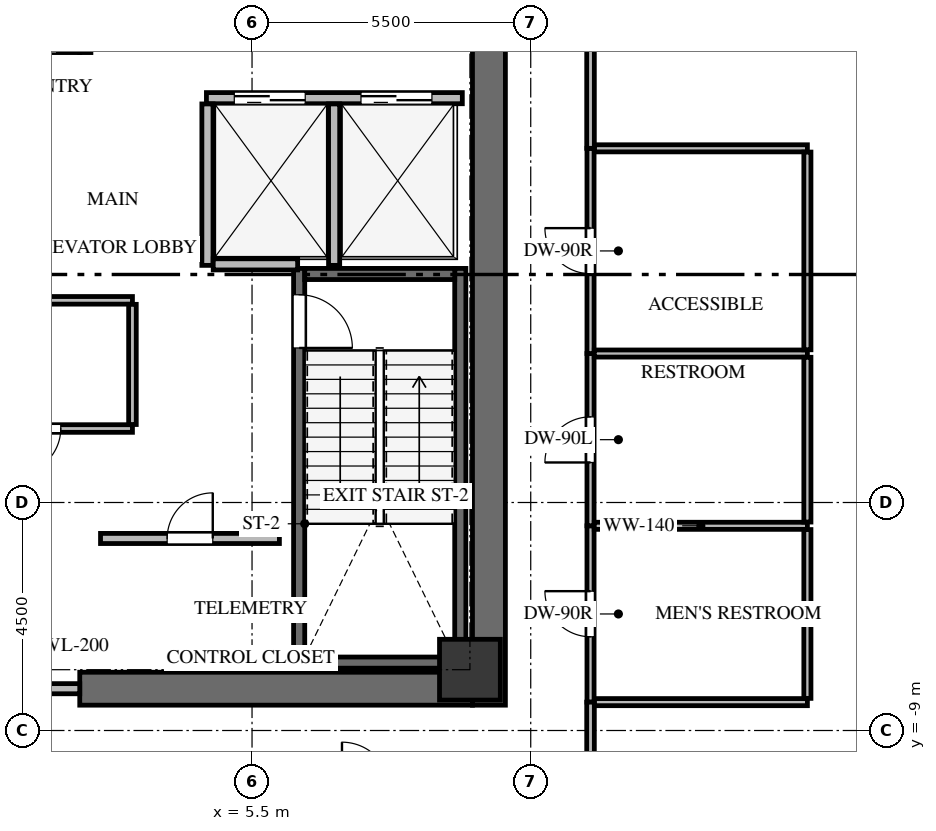
"""IFC4 building model, lengths in metres.
Left out: names, types, materials, properties, quantities, classifications, styles, units other than length and angle.
Written with IfcOpenShell. Run it as: python <this file> out.ifc"""

import sys

from ifc_helpers import new_model, si_unit, direction, frame, frame_2d, origin, origin_2d, place, context, subcontext, project, spatial, rectangle, extrude, source, transform, mapped, element, fill, save


model = new_model("IFC4")
c1 = context("Model", 3, precision=1e-05, world=origin(), true_north=direction((0.0, 1.0)))
c2 = subcontext(c1, "Body", "Model", "MODEL_VIEW")
j1 = project(units=[si_unit("LENGTHUNIT", "METRE"), si_unit("PLANEANGLEUNIT", "RADIAN")], contexts=[c1])
p1 = place(None, origin())
s1 = spatial("IfcSite", under=j1, at=p1, CompositionType="ELEMENT")
p2 = place(p1, origin())
s2 = spatial("IfcBuilding", under=s1, at=p2, CompositionType="ELEMENT")
p3 = place(p2, frame((0.0, 0.0, 162.6)))
s3 = spatial("IfcBuildingStorey", under=s2, at=p3, CompositionType="ELEMENT", Elevation=162.6)
p4 = place(p3, frame((10.175, -8.5, 0.0), z_axis=(0.0, 0.0, 1.0), x_axis=(0.0, 1.0, 0.0)))
e1 = element("IfcWall", 1, at=p4, inside=s3, PredefinedType="SHEAR", context=c2, shape_type="SweptSolid", body=[
    extrude(rectangle(XDim=17.0, YDim=0.65, at=frame_2d((8.5, 0.0))), origin(), (0.0, 0.0, 1.0), 4.6),
])
p5 = place(p3, frame((2.1, -8.175, 0.0), z_axis=(0.0, 0.0, 1.0), x_axis=(1.0, 0.0, 0.0)))
e2 = element("IfcWall", 2, at=p5, inside=s3, PredefinedType="SHEAR", context=c2, shape_type="SweptSolid", body=[
    extrude(rectangle(XDim=7.75, YDim=0.65, at=frame_2d((3.875, 0.0))), origin(), (0.0, 0.0, 1.0), 4.6),
])
p6 = place(p3, frame((9.61, -7.77, -0.32), z_axis=(0.0, 0.0, 1.0), x_axis=(0.0, 1.0, 0.0)))
e3 = element("IfcWall", 3, at=p6, inside=s3, PredefinedType="SHEAR", context=c2, shape_type="SweptSolid", body=[
    extrude(rectangle(XDim=7.89, YDim=0.22, at=frame_2d((3.945, 0.0))), origin(), (0.0, 0.0, 1.0), 4.68),
])
p7 = place(p3, frame((6.43, 0.12, -0.32), z_axis=(0.0, 0.0, 1.0), x_axis=(0.0, -1.0, 0.0)))
e4 = element("IfcWall", 4, at=p7, inside=s3, PredefinedType="SHEAR", context=c2, shape_type="SweptSolid", body=[
    extrude(rectangle(XDim=7.89, YDim=0.22, at=frame_2d((3.945, 0.0))), origin(), (0.0, 0.0, 1.0), 4.68),
])
p8 = place(p7, frame((0.52, 0.0, 0.0)))
e5 = element("IfcOpeningElement", 5, at=p8, cuts=e4, PredefinedType="OPENING", context=c2, shape_type="SweptSolid", body=[
    extrude(rectangle(XDim=1.05, YDim=2.15, at=frame_2d((0.525, 1.075))), frame((0.0, 0.12, 0.0), z_axis=(0.0, -1.0, 0.0), x_axis=(1.0, 0.0, 0.0)), (0.0, 0.0, 1.0), 0.24),
])
for number, where, z_axis, x_axis in (
    (6, (6.54, -7.66, -0.32), (0.0, 0.0, 1.0), (1.0, 0.0, 0.0)),
    (7, (9.5, 0.01, -0.32), (0.0, 0.0, 1.0), (-1.0, 0.0, 0.0)),
):
    element("IfcWall", number, at=place(p3, frame(where, z_axis=z_axis, x_axis=x_axis)), inside=s3, PredefinedType="SHEAR", context=c2, shape_type="SweptSolid", body=[
        extrude(rectangle(XDim=2.96, YDim=0.22, at=frame_2d((1.48, 0.0))), origin(), (0.0, 0.0, 1.0), 4.68),
    ])
p9 = place(p3, frame((2.21, 4.38, -0.32), z_axis=(0.0, 0.0, 1.0), x_axis=(0.0, 1.0, 0.0)))
e8 = element("IfcWall", 8, at=p9, inside=s3, PredefinedType="SHEAR", context=c2, shape_type="SweptSolid", body=[
    extrude(rectangle(XDim=3.4, YDim=0.22, at=frame_2d((1.7, 0.0))), origin(), (0.0, 0.0, 1.0), 4.68),
])
p10 = place(p3, frame((-5.25, 4.49, -0.32), z_axis=(0.0, 0.0, 1.0), x_axis=(1.0, 0.0, 0.0)))
e9 = element("IfcWall", 9, at=p10, inside=s3, PredefinedType="SHEAR", context=c2, shape_type="SweptSolid", body=[
    extrude(rectangle(XDim=7.35, YDim=0.22, at=frame_2d((3.675, 0.0))), origin(), (0.0, 0.0, 1.0), 4.68),
])
p11 = place(p10, frame((5.85, 0.0, 0.0)))
e10 = element("IfcOpeningElement", 10, at=p11, cuts=e9, PredefinedType="OPENING", context=c2, shape_type="SweptSolid", body=[
    extrude(rectangle(XDim=1.05, YDim=2.15, at=frame_2d((0.525, 1.075))), frame((0.0, 0.12, 0.0), z_axis=(0.0, -1.0, 0.0), x_axis=(1.0, 0.0, 0.0)), (0.0, 0.0, 1.0), 0.24),
])
m1 = source(origin(), c2, "Body", "SweptSolid", [
    extrude(rectangle(XDim=1.2, YDim=1.2, at=origin_2d()), origin(), (0.0, 0.0, 1.0), 4.68),
])
p12 = place(p3, frame((9.8, -7.8, -0.32), z_axis=(0.0, 0.0, 1.0), x_axis=(1.0, 0.0, 0.0)))
e11 = element("IfcColumn", 11, at=p12, inside=s3, PredefinedType="COLUMN", context=c2, shape_type="MappedRepresentation", body=[
    mapped(m1, transform((0.0, 0.0, 0.0), x_axis=(1.0, 0.0, 0.0), y_axis=(0.0, 1.0, 0.0), z_axis=(0.0, 0.0, 1.0), scale=1.0)),
])
p13 = place(p3, frame((-2.1, -8.175, 0.0), z_axis=(0.0, 0.0, 1.0), x_axis=(1.0, 0.0, 0.0)))
e12 = element("IfcWall", 12, at=p13, inside=s3, PredefinedType="SOLIDWALL", context=c2, shape_type="SweptSolid", body=[
    extrude(rectangle(XDim=4.2, YDim=0.2, at=frame_2d((2.1, 0.0))), origin(), (0.0, 0.0, 1.0), 4.345),
])
p14 = place(p13, frame((1.2, 0.0, 0.0)))
e13 = element("IfcOpeningElement", 13, at=p14, cuts=e12, PredefinedType="OPENING", context=c2, shape_type="SweptSolid", body=[
    extrude(rectangle(XDim=1.8, YDim=2.15, at=frame_2d((0.9, 1.075))), frame((0.0, 0.11, 0.0), z_axis=(0.0, -1.0, 0.0), x_axis=(1.0, 0.0, 0.0)), (0.0, 0.0, 1.0), 0.22),
])
p15 = place(p3, frame((4.6, 3.48, 0.0), z_axis=(0.0, 0.0, 1.0), x_axis=(1.0, 0.0, 0.0)))
e14 = element("IfcWall", 14, at=p15, inside=s3, PredefinedType="SOLIDWALL", context=c2, shape_type="SweptSolid", body=[
    extrude(rectangle(XDim=5.05, YDim=0.22, at=frame_2d((2.525, 0.0))), origin(), (0.0, 0.0, 1.0), 4.345),
])
p16 = place(p15, frame((0.55, 0.0, 0.0)))
e15 = element("IfcOpeningElement", 15, at=p16, cuts=e14, PredefinedType="OPENING", context=c2, shape_type="SweptSolid", body=[
    extrude(rectangle(XDim=1.4, YDim=2.15, at=frame_2d((0.7, 1.075))), frame((0.0, 0.12, 0.0), z_axis=(0.0, -1.0, 0.0), x_axis=(1.0, 0.0, 0.0)), (0.0, 0.0, 1.0), 0.24),
])
p17 = place(p15, frame((3.05, 0.0, 0.0)))
e16 = element("IfcOpeningElement", 16, at=p17, cuts=e14, PredefinedType="OPENING", context=c2, shape_type="SweptSolid", body=[
    extrude(rectangle(XDim=1.4, YDim=2.15, at=frame_2d((0.7, 1.075))), frame((0.0, 0.12, 0.0), z_axis=(0.0, -1.0, 0.0), x_axis=(1.0, 0.0, 0.0)), (0.0, 0.0, 1.0), 0.24),
])
for number, where, z_axis, x_axis in (
    (17, (4.62, 0.18, 0.0), (0.0, 0.0, 1.0), (0.0, 1.0, 0.0)),
    (18, (7.12, 0.18, 0.0), (0.0, 0.0, 1.0), (0.0, 1.0, 0.0)),
):
    element("IfcWall", number, at=place(p3, frame(where, z_axis=z_axis, x_axis=x_axis)), inside=s3, PredefinedType="SOLIDWALL", context=c2, shape_type="SweptSolid", body=[
        extrude(rectangle(XDim=3.186, YDim=0.22, at=frame_2d((1.593, 0.0))), origin(), (0.0, 0.0, 1.0), 4.345),
    ])
p18 = place(p3, frame((4.734, 0.2, 0.0), z_axis=(0.0, 0.0, 1.0), x_axis=(1.0, 0.0, 0.0)))
e19 = element("IfcWall", 19, at=p18, inside=s3, PredefinedType="SOLIDWALL", context=c2, shape_type="SweptSolid", body=[
    extrude(rectangle(XDim=1.666, YDim=0.22, at=frame_2d((0.833, 0.0))), origin(), (0.0, 0.0, 1.0), 4.345),
])
p19 = place(p3, frame((2.51, -5.21, 0.0), z_axis=(0.0, 0.0, 1.0), x_axis=(1.0, 0.0, 0.0)))
e20 = element("IfcWall", 20, at=p19, inside=s3, PredefinedType="SOLIDWALL", context=c2, shape_type="SweptSolid", body=[
    extrude(rectangle(XDim=3.53, YDim=0.2, at=frame_2d((1.765, 0.0))), origin(), (0.0, 0.0, 1.0), 4.345),
])
p20 = place(p19, frame((1.315, 0.0, 0.0)))
e21 = element("IfcOpeningElement", 21, at=p20, cuts=e20, PredefinedType="OPENING", context=c2, shape_type="SweptSolid", body=[
    extrude(rectangle(XDim=0.9, YDim=2.05, at=frame_2d((0.45, 1.025))), frame((0.0, 0.11, 0.0), z_axis=(0.0, -1.0, 0.0), x_axis=(1.0, 0.0, 0.0)), (0.0, 0.0, 1.0), 0.22),
])
p21 = place(p3, frame((3.14, -3.04, 0.0), z_axis=(0.0, 0.0, 1.0), x_axis=(-1.0, 0.0, 0.0)))
e22 = element("IfcWall", 22, at=p21, inside=s3, PredefinedType="PARTITIONING", context=c2, shape_type="SweptSolid", body=[
    extrude(rectangle(XDim=3.73, YDim=0.15, at=frame_2d((1.865, 0.0))), origin(), (0.0, 0.0, 1.0), 4.345),
])
p22 = place(p21, frame((1.415, 0.0, 0.0)))
e23 = element("IfcOpeningElement", 23, at=p22, cuts=e22, PredefinedType="OPENING", context=c2, shape_type="SweptSolid", body=[
    extrude(rectangle(XDim=0.9, YDim=2.05, at=frame_2d((0.45, 1.025))), frame((0.0, 0.085, 0.0), z_axis=(0.0, -1.0, 0.0), x_axis=(1.0, 0.0, 0.0)), (0.0, 0.0, 1.0), 0.17),
])
p23 = place(p3, frame((-0.59, -0.51, 0.0), z_axis=(0.0, 0.0, 1.0), x_axis=(1.0, 0.0, 0.0)))
e24 = element("IfcWall", 24, at=p23, inside=s3, PredefinedType="PARTITIONING", context=c2, shape_type="SweptSolid", body=[
    extrude(rectangle(XDim=3.73, YDim=0.15, at=frame_2d((1.865, 0.0))), origin(), (0.0, 0.0, 1.0), 4.345),
])
p24 = place(p3, frame((3.14, -0.589, 0.0), z_axis=(0.0, 0.0, 1.0), x_axis=(0.0, -1.0, 0.0)))
e25 = element("IfcWall", 25, at=p24, inside=s3, PredefinedType="PARTITIONING", context=c2, shape_type="SweptSolid", body=[
    extrude(rectangle(XDim=2.372, YDim=0.15, at=frame_2d((1.186, 0.0))), origin(), (0.0, 0.0, 1.0), 4.345),
])
p25 = place(p3, frame((12.18, -8.44, 0.0), z_axis=(0.0, 0.0, 1.0), x_axis=(0.0, 1.0, 0.0)))
e26 = element("IfcWall", 26, at=p25, inside=s3, PredefinedType="PARTITIONING", context=c2, shape_type="SweptSolid", body=[
    extrude(rectangle(XDim=3.48, YDim=0.14, at=frame_2d((1.74, 0.0))), origin(), (0.0, 0.0, 1.0), 4.345),
])
p26 = place(p25, frame((1.29, 0.0, 0.0)))
e27 = element("IfcOpeningElement", 27, at=p26, cuts=e26, PredefinedType="OPENING", context=c2, shape_type="SweptSolid", body=[
    extrude(rectangle(XDim=0.9, YDim=2.05, at=frame_2d((0.45, 1.025))), frame((0.0, 0.08, 0.0), z_axis=(0.0, -1.0, 0.0), x_axis=(1.0, 0.0, 0.0)), (0.0, 0.0, 1.0), 0.16),
])
p27 = place(p3, frame((12.18, -4.96, 0.0), z_axis=(0.0, 0.0, 1.0), x_axis=(0.0, 1.0, 0.0)))
e28 = element("IfcWall", 28, at=p27, inside=s3, PredefinedType="PARTITIONING", context=c2, shape_type="SweptSolid", body=[
    extrude(rectangle(XDim=3.4, YDim=0.14, at=frame_2d((1.7, 0.0))), origin(), (0.0, 0.0, 1.0), 4.345),
])
p28 = place(p27, frame((1.25, 0.0, 0.0)))
e29 = element("IfcOpeningElement", 29, at=p28, cuts=e28, PredefinedType="OPENING", context=c2, shape_type="SweptSolid", body=[
    extrude(rectangle(XDim=0.9, YDim=2.05, at=frame_2d((0.45, 1.025))), frame((0.0, 0.08, 0.0), z_axis=(0.0, -1.0, 0.0), x_axis=(1.0, 0.0, 0.0)), (0.0, 0.0, 1.0), 0.16),
])
p29 = place(p3, frame((12.18, -1.56, 0.0), z_axis=(0.0, 0.0, 1.0), x_axis=(0.0, 1.0, 0.0)))
e30 = element("IfcWall", 30, at=p29, inside=s3, PredefinedType="PARTITIONING", context=c2, shape_type="SweptSolid", body=[
    extrude(rectangle(XDim=4.05, YDim=0.14, at=frame_2d((2.025, 0.0))), origin(), (0.0, 0.0, 1.0), 3.542),
])
p30 = place(p29, frame((1.575, 0.0, 0.0)))
e31 = element("IfcOpeningElement", 31, at=p30, cuts=e30, PredefinedType="OPENING", context=c2, shape_type="SweptSolid", body=[
    extrude(rectangle(XDim=0.9, YDim=2.05, at=frame_2d((0.45, 1.025))), frame((0.0, 0.08, 0.0), z_axis=(0.0, -1.0, 0.0), x_axis=(1.0, 0.0, 0.0)), (0.0, 0.0, 1.0), 0.16),
])
p31 = place(p3, frame((12.18, 2.49, 0.0), z_axis=(0.0, 0.0, 1.0), x_axis=(0.0, 1.0, 0.0)))
e32 = element("IfcWall", 32, at=p31, inside=s3, PredefinedType="PARTITIONING", context=c2, shape_type="SweptSolid", body=[
    extrude(rectangle(XDim=7.611, YDim=0.15, at=frame_2d((3.806, 0.0))), origin(), (0.0, 0.0, 1.0), 4.345),
])
p32 = place(p31, frame((3.345, 0.0, 0.0)))
e33 = element("IfcOpeningElement", 33, at=p32, cuts=e32, PredefinedType="OPENING", context=c2, shape_type="SweptSolid", body=[
    extrude(rectangle(XDim=0.92, YDim=2.1, at=frame_2d((0.46, 1.05))), frame((0.0, 0.085, 0.0), z_axis=(0.0, -1.0, 0.0), x_axis=(1.0, 0.0, 0.0)), (0.0, 0.0, 1.0), 0.17),
])
p33 = place(p3, frame((12.18, -10.101, 0.0), z_axis=(0.0, 0.0, 1.0), x_axis=(0.0, 1.0, 0.0)))
e34 = element("IfcWall", 34, at=p33, inside=s3, PredefinedType="PARTITIONING", context=c2, shape_type="SweptSolid", body=[
    extrude(rectangle(XDim=1.661, YDim=0.15, at=frame_2d((0.831, 0.0))), origin(), (0.0, 0.0, 1.0), 4.345),
])
p34 = place(p3, frame((12.254, -4.96, 0.0), z_axis=(0.0, 0.0, 1.0), x_axis=(1.0, 0.0, 0.0)))
e35 = element("IfcWall", 35, at=p34, inside=s3, PredefinedType="PARTITIONING", context=c2, shape_type="SweptSolid", body=[
    extrude(rectangle(XDim=4.206, YDim=0.14, at=frame_2d((2.103, 0.0))), origin(), (0.0, 0.0, 1.0), 4.345),
])
p35 = place(p3, frame((16.46, -8.44, 0.0), z_axis=(0.0, 0.0, 1.0), x_axis=(-1.0, 0.0, 0.0)))
e36 = element("IfcWall", 36, at=p35, inside=s3, PredefinedType="PARTITIONING", context=c2, shape_type="SweptSolid", body=[
    extrude(rectangle(XDim=4.201, YDim=0.14, at=frame_2d((2.101, 0.0))), origin(), (0.0, 0.0, 1.0), 4.345),
])
p36 = place(p3, frame((16.46, -5.034, 0.0), z_axis=(0.0, 0.0, 1.0), x_axis=(0.0, -1.0, 0.0)))
e37 = element("IfcWall", 37, at=p36, inside=s3, PredefinedType="PARTITIONING", context=c2, shape_type="SweptSolid", body=[
    extrude(rectangle(XDim=3.332, YDim=0.14, at=frame_2d((1.666, 0.0))), origin(), (0.0, 0.0, 1.0), 4.345),
])
p37 = place(p3, frame((12.254, -1.56, 0.0), z_axis=(0.0, 0.0, 1.0), x_axis=(1.0, 0.0, 0.0)))
e38 = element("IfcWall", 38, at=p37, inside=s3, PredefinedType="PARTITIONING", context=c2, shape_type="SweptSolid", body=[
    extrude(rectangle(XDim=4.206, YDim=0.14, at=frame_2d((2.103, 0.0))), origin(), (0.0, 0.0, 1.0), 4.345),
])
p38 = place(p3, frame((16.46, -1.634, 0.0), z_axis=(0.0, 0.0, 1.0), x_axis=(0.0, -1.0, 0.0)))
e39 = element("IfcWall", 39, at=p38, inside=s3, PredefinedType="PARTITIONING", context=c2, shape_type="SweptSolid", body=[
    extrude(rectangle(XDim=3.252, YDim=0.14, at=frame_2d((1.626, 0.0))), origin(), (0.0, 0.0, 1.0), 4.345),
])
p39 = place(p3, frame((12.259, 2.49, 0.0), z_axis=(0.0, 0.0, 1.0), x_axis=(1.0, 0.0, 0.0)))
e40 = element("IfcWall", 40, at=p39, inside=s3, PredefinedType="PARTITIONING", context=c2, shape_type="SweptSolid", body=[
    extrude(rectangle(XDim=4.201, YDim=0.14, at=frame_2d((2.101, 0.0))), origin(), (0.0, 0.0, 1.0), 4.345),
])
p40 = place(p3, frame((16.46, 2.416, 0.0), z_axis=(0.0, 0.0, 1.0), x_axis=(0.0, -1.0, 0.0)))
e41 = element("IfcWall", 41, at=p40, inside=s3, PredefinedType="PARTITIONING", context=c2, shape_type="SweptSolid", body=[
    extrude(rectangle(XDim=3.902, YDim=0.14, at=frame_2d((1.951, 0.0))), origin(), (0.0, 0.0, 1.0), 3.542),
])
m2 = source(origin(), c2, "Body", "SweptSolid", [
    extrude(rectangle(XDim=1.05, YDim=2.15, at=frame_2d((0.525, 1.075))), frame((0.0, 0.025, 0.0), z_axis=(0.0, -1.0, 0.0), x_axis=(1.0, 0.0, 0.0)), (0.0, 0.0, 1.0), 0.05),
])
p41 = place(p8, origin())
e42 = element("IfcDoor", 42, at=p41, inside=s3, OperationType="SINGLE_SWING_RIGHT", PredefinedType="DOOR", context=c2, shape_type="MappedRepresentation", body=[
    mapped(m2, transform((0.0, 0.0, 0.0), x_axis=(1.0, 0.0, 0.0), y_axis=(0.0, 1.0, 0.0), z_axis=(0.0, 0.0, 1.0), scale=1.0)),
])
fill(e5, e42)
m3 = source(origin(), c2, "Body", "SweptSolid", [
    extrude(rectangle(XDim=1.4, YDim=2.15, at=frame_2d((0.7, 1.075))), frame((0.0, 0.025, 0.0), z_axis=(0.0, -1.0, 0.0), x_axis=(1.0, 0.0, 0.0)), (0.0, 0.0, 1.0), 0.05),
])
p42 = place(p16, origin())
e43 = element("IfcDoor", 43, at=p42, inside=s3, OperationType="DOUBLE_DOOR_SLIDING", PredefinedType="DOOR", context=c2, shape_type="MappedRepresentation", body=[
    mapped(m3, transform((0.0, 0.0, 0.0), x_axis=(1.0, 0.0, 0.0), y_axis=(0.0, 1.0, 0.0), z_axis=(0.0, 0.0, 1.0), scale=1.0)),
])
fill(e15, e43)
p43 = place(p17, origin())
e44 = element("IfcDoor", 44, at=p43, inside=s3, OperationType="DOUBLE_DOOR_SLIDING", PredefinedType="DOOR", context=c2, shape_type="MappedRepresentation", body=[
    mapped(m3, transform((0.0, 0.0, 0.0), x_axis=(1.0, 0.0, 0.0), y_axis=(0.0, 1.0, 0.0), z_axis=(0.0, 0.0, 1.0), scale=1.0)),
])
fill(e16, e44)
m4 = source(origin(), c2, "Body", "SweptSolid", [
    extrude(rectangle(XDim=0.9, YDim=2.05, at=frame_2d((0.45, 1.025))), frame((0.0, 0.025, 0.0), z_axis=(0.0, -1.0, 0.0), x_axis=(1.0, 0.0, 0.0)), (0.0, 0.0, 1.0), 0.05),
])
p44 = place(p20, origin())
e45 = element("IfcDoor", 45, at=p44, inside=s3, OperationType="SINGLE_SWING_RIGHT", PredefinedType="DOOR", context=c2, shape_type="MappedRepresentation", body=[
    mapped(m4, transform((0.0, 0.0, 0.0), x_axis=(1.0, 0.0, 0.0), y_axis=(0.0, 1.0, 0.0), z_axis=(0.0, 0.0, 1.0), scale=1.0)),
])
fill(e21, e45)
p45 = place(p22, origin())
e46 = element("IfcDoor", 46, at=p45, inside=s3, OperationType="SINGLE_SWING_RIGHT", PredefinedType="DOOR", context=c2, shape_type="MappedRepresentation", body=[
    mapped(m4, transform((0.0, 0.0, 0.0), x_axis=(1.0, 0.0, 0.0), y_axis=(0.0, 1.0, 0.0), z_axis=(0.0, 0.0, 1.0), scale=1.0)),
])
fill(e23, e46)
m5 = source(origin(), c2, "Body", "SweptSolid", [
    extrude(rectangle(XDim=0.9, YDim=2.05, at=frame_2d((0.45, 1.025))), frame((0.0, 0.025, 0.0), z_axis=(0.0, -1.0, 0.0), x_axis=(1.0, 0.0, 0.0)), (0.0, 0.0, 1.0), 0.05),
])
p46 = place(p26, origin())
e47 = element("IfcDoor", 47, at=p46, inside=s3, OperationType="SINGLE_SWING_RIGHT", PredefinedType="DOOR", context=c2, shape_type="MappedRepresentation", body=[
    mapped(m5, transform((0.0, 0.0, 0.0), x_axis=(1.0, 0.0, 0.0), y_axis=(0.0, 1.0, 0.0), z_axis=(0.0, 0.0, 1.0), scale=1.0)),
])
fill(e27, e47)
m6 = source(origin(), c2, "Body", "SweptSolid", [
    extrude(rectangle(XDim=0.9, YDim=2.05, at=frame_2d((0.45, 1.025))), frame((0.0, 0.025, 0.0), z_axis=(0.0, -1.0, 0.0), x_axis=(1.0, 0.0, 0.0)), (0.0, 0.0, 1.0), 0.05),
])
p47 = place(p28, origin())
e48 = element("IfcDoor", 48, at=p47, inside=s3, OperationType="SINGLE_SWING_LEFT", PredefinedType="DOOR", context=c2, shape_type="MappedRepresentation", body=[
    mapped(m6, transform((0.0, 0.0, 0.0), x_axis=(1.0, 0.0, 0.0), y_axis=(0.0, 1.0, 0.0), z_axis=(0.0, 0.0, 1.0), scale=1.0)),
])
fill(e29, e48)
p48 = place(p30, origin())
e49 = element("IfcDoor", 49, at=p48, inside=s3, OperationType="SINGLE_SWING_RIGHT", PredefinedType="DOOR", context=c2, shape_type="MappedRepresentation", body=[
    mapped(m5, transform((0.0, 0.0, 0.0), x_axis=(1.0, 0.0, 0.0), y_axis=(0.0, 1.0, 0.0), z_axis=(0.0, 0.0, 1.0), scale=1.0)),
])
fill(e31, e49)
save(model, sys.argv[1])
